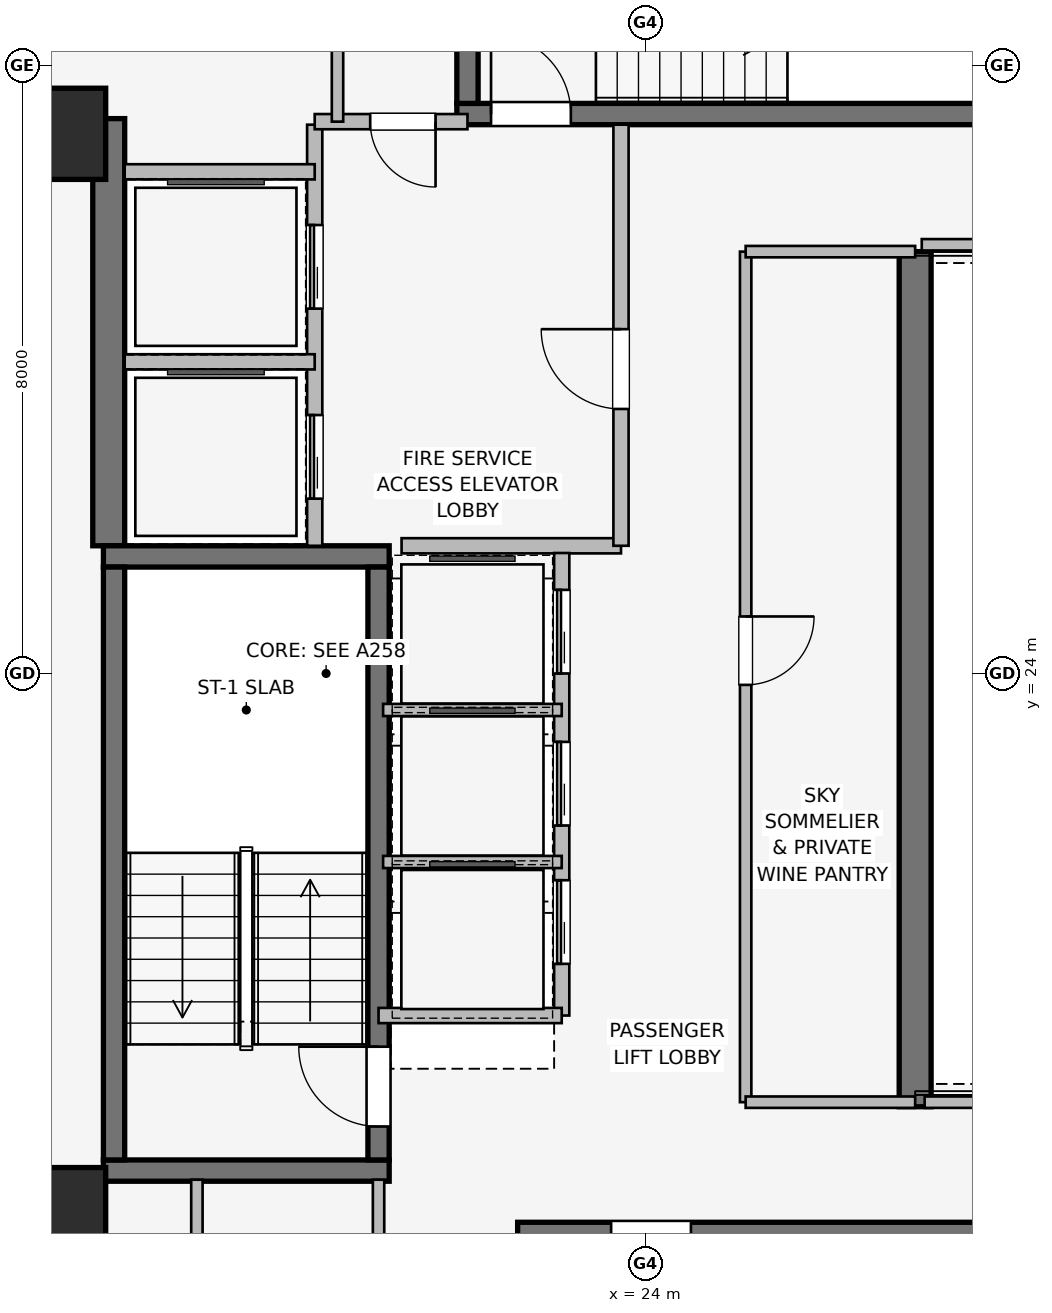
"""IFC4 building model, lengths in metres.
Left out: names, types, materials, properties, quantities, classifications, styles, units other than length and angle.
Written with IfcOpenShell. Run it as: python <this file> out.ifc"""

import sys

from ifc_helpers import new_model, si_unit, direction, frame, frame_2d, origin, origin_2d, place, context, subcontext, project, spatial, rectangle, extrude, element, fill, save


model = new_model("IFC4")
c1 = context("Model", 3, precision=1e-05, world=origin(), true_north=direction((0.0, 1.0)))
c2 = subcontext(c1, "Body", "Model", "MODEL_VIEW")
j1 = project(units=[si_unit("LENGTHUNIT", "METRE"), si_unit("PLANEANGLEUNIT", "RADIAN")], contexts=[c1])
p1 = place(None, origin())
s1 = spatial("IfcSite", under=j1, at=p1, CompositionType="ELEMENT")
p2 = place(p1, origin())
s2 = spatial("IfcBuilding", under=s1, at=p2, CompositionType="ELEMENT")
p3 = place(p2, frame((0.0, 0.0, 206.8)))
s3 = spatial("IfcBuildingStorey", under=s2, at=p3, CompositionType="ELEMENT", Elevation=206.8)
p4 = place(p3, frame((16.94, 25.68, 0.0), z_axis=(0.0, 0.0, 1.0), x_axis=(0.0, 1.0, 0.0)))
e1 = element("IfcWall", 1, at=p4, inside=s3, PredefinedType="SHEAR", context=c2, shape_type="SweptSolid", body=[
    extrude(rectangle(XDim=5.62, YDim=0.42, at=frame_2d((2.81, 0.0))), origin(), (0.0, 0.0, 1.0), 3.45),
])
p5 = place(p3, frame((27.55, 29.55, 0.0), z_axis=(0.0, 0.0, 1.0), x_axis=(0.0, -1.0, 0.0)))
e2 = element("IfcWall", 2, at=p5, inside=s3, PredefinedType="SHEAR", context=c2, shape_type="SweptSolid", body=[
    extrude(rectangle(XDim=11.25, YDim=0.42, at=frame_2d((5.625, 0.0))), origin(), (0.0, 0.0, 1.0), 3.45),
])
for number, where, z_axis, x_axis in (
    (3, (16.87, 17.46, 0.0), (0.0, 0.0, 1.0), (1.0, 0.0, 0.0)),
    (4, (20.63, 25.54, 0.0), (0.0, 0.0, 1.0), (-1.0, 0.0, 0.0)),
):
    element("IfcWall", number, at=place(p3, frame(where, z_axis=z_axis, x_axis=x_axis)), inside=s3, PredefinedType="SHEAR", context=c2, shape_type="SweptSolid", body=[
        extrude(rectangle(XDim=3.76, YDim=0.28, at=frame_2d((1.88, 0.0))), origin(), (0.0, 0.0, 1.0), 3.45),
    ])
p6 = place(p3, frame((17.01, 25.4, 0.0), z_axis=(0.0, 0.0, 1.0), x_axis=(0.0, -1.0, 0.0)))
e5 = element("IfcWall", 5, at=p6, inside=s3, PredefinedType="SHEAR", context=c2, shape_type="SweptSolid", body=[
    extrude(rectangle(XDim=7.8, YDim=0.28, at=frame_2d((3.9, 0.0))), origin(), (0.0, 0.0, 1.0), 3.45),
])
p7 = place(p3, frame((20.49, 17.6, 0.0), z_axis=(0.0, 0.0, 1.0), x_axis=(0.0, 1.0, 0.0)))
e6 = element("IfcWall", 6, at=p7, inside=s3, PredefinedType="SHEAR", context=c2, shape_type="SweptSolid", body=[
    extrude(rectangle(XDim=7.8, YDim=0.28, at=frame_2d((3.9, 0.0))), origin(), (0.0, 0.0, 1.0), 3.45),
])
p8 = place(p7, frame((0.44, 0.0, 0.0)))
e7 = element("IfcOpeningElement", 7, at=p8, cuts=e6, PredefinedType="OPENING", context=c2, shape_type="SweptSolid", body=[
    extrude(rectangle(XDim=1.05, YDim=2.0, at=frame_2d((0.525, 1.0))), frame((0.0, 0.15, 0.0), z_axis=(0.0, -1.0, 0.0), x_axis=(1.0, 0.0, 0.0)), (0.0, 0.0, 1.0), 0.3),
])
p9 = place(p3, frame((30.68, 16.64, 0.0), z_axis=(0.0, 0.0, 1.0), x_axis=(-1.0, 0.0, 0.0)))
e8 = element("IfcWall", 8, at=p9, inside=s3, PredefinedType="SHEAR", context=c2, shape_type="SweptSolid", body=[
    extrude(rectangle(XDim=8.36, YDim=0.28, at=frame_2d((4.18, 0.0))), origin(), (0.0, 0.0, 1.0), 3.45),
])
p10 = place(p9, frame((6.08, 0.0, 0.0)))
e9 = element("IfcOpeningElement", 9, at=p10, cuts=e8, PredefinedType="OPENING", context=c2, shape_type="SweptSolid", body=[
    extrude(rectangle(XDim=1.05, YDim=2.0, at=frame_2d((0.525, 1.0))), frame((0.0, 0.15, 0.0), z_axis=(0.0, -1.0, 0.0), x_axis=(1.0, 0.0, 0.0)), (0.0, 0.0, 1.0), 0.3),
])
p11 = place(p3, frame((21.52, 31.36, 0.0), z_axis=(0.0, 0.0, 1.0), x_axis=(1.0, 0.0, 0.0)))
e10 = element("IfcWall", 10, at=p11, inside=s3, PredefinedType="SHEAR", context=c2, shape_type="SweptSolid", body=[
    extrude(rectangle(XDim=8.36, YDim=0.28, at=frame_2d((4.18, 0.0))), origin(), (0.0, 0.0, 1.0), 3.45),
])
p12 = place(p11, frame((0.45, 0.0, 0.0)))
e11 = element("IfcOpeningElement", 11, at=p12, cuts=e10, PredefinedType="OPENING", context=c2, shape_type="SweptSolid", body=[
    extrude(rectangle(XDim=1.05, YDim=2.0, at=frame_2d((0.525, 1.0))), frame((0.0, 0.15, 0.0), z_axis=(0.0, -1.0, 0.0), x_axis=(1.0, 0.0, 0.0)), (0.0, 0.0, 1.0), 0.3),
])
p13 = place(p3, frame((21.66, 34.7, 0.0), z_axis=(0.0, 0.0, 1.0), x_axis=(0.0, -1.0, 0.0)))
e12 = element("IfcWall", 12, at=p13, inside=s3, PredefinedType="SHEAR", context=c2, shape_type="SweptSolid", body=[
    extrude(rectangle(XDim=3.2, YDim=0.28, at=frame_2d((1.6, 0.0))), origin(), (0.0, 0.0, 1.0), 3.45),
])
for number, where, z_axis, x_axis in (
    (13, (16.3, 16.9, 0.0), (0.0, 0.0, 1.0), (1.0, 0.0, 0.0)),
    (14, (16.3, 31.1, 0.0), (0.0, 0.0, 1.0), (1.0, 0.0, 0.0)),
):
    element("IfcColumn", number, at=place(p3, frame(where, z_axis=z_axis, x_axis=x_axis)), inside=s3, PredefinedType="COLUMN", context=c2, shape_type="SweptSolid", body=[
        extrude(rectangle(XDim=1.2, YDim=1.2, at=origin_2d()), origin(), (0.0, 0.0, 1.0), 3.45),
    ])
p14 = place(p3, frame((19.65, 25.68, 0.0), z_axis=(0.0, 0.0, 1.0), x_axis=(0.0, 1.0, 0.0)))
e15 = element("IfcWall", 15, at=p14, inside=s3, PredefinedType="PARTITIONING", context=c2, shape_type="SweptSolid", body=[
    extrude(rectangle(XDim=5.54, YDim=0.2, at=frame_2d((2.77, 0.0))), origin(), (0.0, 0.0, 1.0), 3.19),
])
p15 = place(p14, frame((0.62, 0.0, 0.0)))
e16 = element("IfcOpeningElement", 16, at=p15, cuts=e15, PredefinedType="OPENING", context=c2, shape_type="SweptSolid", body=[
    extrude(rectangle(XDim=1.1, YDim=2.2, at=frame_2d((0.55, 1.1))), frame((0.0, 0.11, 0.0), z_axis=(0.0, -1.0, 0.0), x_axis=(1.0, 0.0, 0.0)), (0.0, 0.0, 1.0), 0.22),
])
p16 = place(p14, frame((3.12, 0.0, 0.0)))
e17 = element("IfcOpeningElement", 17, at=p16, cuts=e15, PredefinedType="OPENING", context=c2, shape_type="SweptSolid", body=[
    extrude(rectangle(XDim=1.1, YDim=2.2, at=frame_2d((0.55, 1.1))), frame((0.0, 0.11, 0.0), z_axis=(0.0, -1.0, 0.0), x_axis=(1.0, 0.0, 0.0)), (0.0, 0.0, 1.0), 0.22),
])
p17 = place(p3, frame((20.793, 25.68, 0.0), z_axis=(0.0, 0.0, 1.0), x_axis=(1.0, 0.0, 0.0)))
e18 = element("IfcWall", 18, at=p17, inside=s3, PredefinedType="PARTITIONING", context=c2, shape_type="SweptSolid", body=[
    extrude(rectangle(XDim=2.887, YDim=0.2, at=frame_2d((1.443, 0.0))), origin(), (0.0, 0.0, 1.0), 3.19),
])
p18 = place(p3, frame((23.68, 25.68, 0.0), z_axis=(0.0, 0.0, 1.0), x_axis=(0.0, 1.0, 0.0)))
e19 = element("IfcWall", 19, at=p18, inside=s3, PredefinedType="PARTITIONING", context=c2, shape_type="SweptSolid", body=[
    extrude(rectangle(XDim=5.54, YDim=0.2, at=frame_2d((2.77, 0.0))), origin(), (0.0, 0.0, 1.0), 3.19),
])
p19 = place(p18, frame((1.8, 0.0, 0.0)))
e20 = element("IfcOpeningElement", 20, at=p19, cuts=e19, PredefinedType="OPENING", context=c2, shape_type="SweptSolid", body=[
    extrude(rectangle(XDim=1.05, YDim=2.0, at=frame_2d((0.525, 1.0))), frame((0.0, 0.11, 0.0), z_axis=(0.0, -1.0, 0.0), x_axis=(1.0, 0.0, 0.0)), (0.0, 0.0, 1.0), 0.22),
])
p20 = place(p3, frame((21.66, 31.26, 0.0), z_axis=(0.0, 0.0, 1.0), x_axis=(-1.0, 0.0, 0.0)))
e21 = element("IfcWall", 21, at=p20, inside=s3, PredefinedType="PARTITIONING", context=c2, shape_type="SweptSolid", body=[
    extrude(rectangle(XDim=2.01, YDim=0.2, at=frame_2d((1.005, 0.0))), origin(), (0.0, 0.0, 1.0), 3.19),
])
p21 = place(p20, frame((0.42, 0.0, 0.0)))
e22 = element("IfcOpeningElement", 22, at=p21, cuts=e21, PredefinedType="OPENING", context=c2, shape_type="SweptSolid", body=[
    extrude(rectangle(XDim=0.86, YDim=2.0, at=frame_2d((0.43, 1.0))), frame((0.0, 0.11, 0.0), z_axis=(0.0, -1.0, 0.0), x_axis=(1.0, 0.0, 0.0)), (0.0, 0.0, 1.0), 0.22),
])
p22 = place(p3, frame((17.15, 28.1, 0.0), z_axis=(0.0, 0.0, 1.0), x_axis=(1.0, 0.0, 0.0)))
e23 = element("IfcWall", 23, at=p22, inside=s3, PredefinedType="PARTITIONING", context=c2, shape_type="SweptSolid", body=[
    extrude(rectangle(XDim=2.5, YDim=0.2, at=frame_2d((1.25, 0.0))), origin(), (0.0, 0.0, 1.0), 3.19),
])
p23 = place(p3, frame((19.65, 30.6, 0.0), z_axis=(0.0, 0.0, 1.0), x_axis=(-1.0, 0.0, 0.0)))
e24 = element("IfcWall", 24, at=p23, inside=s3, PredefinedType="PARTITIONING", context=c2, shape_type="SweptSolid", body=[
    extrude(rectangle(XDim=2.5, YDim=0.2, at=frame_2d((1.25, 0.0))), origin(), (0.0, 0.0, 1.0), 2.09),
])
p24 = place(p3, frame((22.9, 19.5, 0.0), z_axis=(0.0, 0.0, 1.0), x_axis=(0.0, 1.0, 0.0)))
e25 = element("IfcWall", 25, at=p24, inside=s3, PredefinedType="PARTITIONING", context=c2, shape_type="SweptSolid", body=[
    extrude(rectangle(XDim=6.085, YDim=0.2, at=frame_2d((3.042, 0.0))), origin(), (0.0, 0.0, 1.0), 3.19),
])
p25 = place(p24, frame((0.68, 0.0, 0.0)))
e26 = element("IfcOpeningElement", 26, at=p25, cuts=e25, PredefinedType="OPENING", context=c2, shape_type="SweptSolid", body=[
    extrude(rectangle(XDim=1.1, YDim=2.2, at=frame_2d((0.55, 1.1))), frame((0.0, 0.11, 0.0), z_axis=(0.0, -1.0, 0.0), x_axis=(1.0, 0.0, 0.0)), (0.0, 0.0, 1.0), 0.22),
])
p26 = place(p24, frame((2.5, 0.0, 0.0)))
e27 = element("IfcOpeningElement", 27, at=p26, cuts=e25, PredefinedType="OPENING", context=c2, shape_type="SweptSolid", body=[
    extrude(rectangle(XDim=1.1, YDim=2.2, at=frame_2d((0.55, 1.1))), frame((0.0, 0.11, 0.0), z_axis=(0.0, -1.0, 0.0), x_axis=(1.0, 0.0, 0.0)), (0.0, 0.0, 1.0), 0.22),
])
p27 = place(p24, frame((4.5, 0.0, 0.0)))
e28 = element("IfcOpeningElement", 28, at=p27, cuts=e25, PredefinedType="OPENING", context=c2, shape_type="SweptSolid", body=[
    extrude(rectangle(XDim=1.1, YDim=2.2, at=frame_2d((0.55, 1.1))), frame((0.0, 0.11, 0.0), z_axis=(0.0, -1.0, 0.0), x_axis=(1.0, 0.0, 0.0)), (0.0, 0.0, 1.0), 0.22),
])
p28 = place(p3, frame((20.49, 19.5, 0.0), z_axis=(0.0, 0.0, 1.0), x_axis=(1.0, 0.0, 0.0)))
e29 = element("IfcWall", 29, at=p28, inside=s3, PredefinedType="PARTITIONING", context=c2, shape_type="SweptSolid", body=[
    extrude(rectangle(XDim=2.41, YDim=0.2, at=frame_2d((1.205, 0.0))), origin(), (0.0, 0.0, 1.0), 2.09),
])
for number, where, z_axis, x_axis in (
    (30, (20.55, 21.52, 0.0), (0.0, 0.0, 1.0), (1.0, 0.0, 0.0)),
    (31, (20.55, 23.52, 0.0), (0.0, 0.0, 1.0), (1.0, 0.0, 0.0)),
):
    element("IfcWall", number, at=place(p3, frame(where, z_axis=z_axis, x_axis=x_axis)), inside=s3, PredefinedType="PARTITIONING", context=c2, shape_type="SweptSolid", body=[
        extrude(rectangle(XDim=2.35, YDim=0.16, at=frame_2d((1.175, 0.0))), origin(), (0.0, 0.0, 1.0), 3.19),
    ])
p29 = place(p3, frame((25.32, 29.55, 0.0), z_axis=(0.0, 0.0, 1.0), x_axis=(0.0, -1.0, 0.0)))
e32 = element("IfcWall", 32, at=p29, inside=s3, PredefinedType="PARTITIONING", context=c2, shape_type="SweptSolid", body=[
    extrude(rectangle(XDim=11.19, YDim=0.15, at=frame_2d((5.595, 0.0))), origin(), (0.0, 0.0, 1.0), 3.19),
])
p30 = place(p29, frame((4.8, 0.0, 0.0)))
e33 = element("IfcOpeningElement", 33, at=p30, cuts=e32, PredefinedType="OPENING", context=c2, shape_type="SweptSolid", body=[
    extrude(rectangle(XDim=0.9, YDim=2.0, at=frame_2d((0.45, 1.0))), frame((0.0, 0.085, 0.0), z_axis=(0.0, -1.0, 0.0), x_axis=(1.0, 0.0, 0.0)), (0.0, 0.0, 1.0), 0.17),
])
p31 = place(p3, frame((25.32, 18.36, 0.0), z_axis=(0.0, 0.0, 1.0), x_axis=(1.0, 0.0, 0.0)))
e34 = element("IfcWall", 34, at=p31, inside=s3, PredefinedType="PARTITIONING", context=c2, shape_type="SweptSolid", body=[
    extrude(rectangle(XDim=2.23, YDim=0.15, at=frame_2d((1.115, 0.0))), origin(), (0.0, 0.0, 1.0), 3.19),
])
p32 = place(p3, frame((27.55, 29.55, 0.0), z_axis=(0.0, 0.0, 1.0), x_axis=(-1.0, 0.0, 0.0)))
e35 = element("IfcWall", 35, at=p32, inside=s3, PredefinedType="PARTITIONING", context=c2, shape_type="SweptSolid", body=[
    extrude(rectangle(XDim=2.23, YDim=0.15, at=frame_2d((1.115, 0.0))), origin(), (0.0, 0.0, 1.0), 2.09),
])
p33 = place(p3, frame((18.1, 17.34, 0.0), z_axis=(0.0, 0.0, 1.0), x_axis=(0.0, -1.0, 0.0)))
e36 = element("IfcWall", 36, at=p33, inside=s3, PredefinedType="PARTITIONING", context=c2, shape_type="SweptSolid", body=[
    extrude(rectangle(XDim=3.66, YDim=0.15, at=frame_2d((1.83, 0.0))), origin(), (0.0, 0.0, 1.0), 3.19),
])
p34 = place(p3, frame((20.49, 13.68, 0.0), z_axis=(0.0, 0.0, 1.0), x_axis=(0.0, 1.0, 0.0)))
e37 = element("IfcWall", 37, at=p34, inside=s3, PredefinedType="PARTITIONING", context=c2, shape_type="SweptSolid", body=[
    extrude(rectangle(XDim=3.66, YDim=0.15, at=frame_2d((1.83, 0.0))), origin(), (0.0, 0.0, 1.0), 3.19),
])
p35 = place(p34, frame((1.25, 0.0, 0.0)))
e38 = element("IfcOpeningElement", 38, at=p35, cuts=e37, PredefinedType="OPENING", context=c2, shape_type="SweptSolid", body=[
    extrude(rectangle(XDim=0.9, YDim=2.0, at=frame_2d((0.45, 1.0))), frame((0.0, 0.085, 0.0), z_axis=(0.0, -1.0, 0.0), x_axis=(1.0, 0.0, 0.0)), (0.0, 0.0, 1.0), 0.17),
])
p36 = place(p3, frame((19.95, 32.85, 0.0), z_axis=(0.0, 0.0, 1.0), x_axis=(0.0, -1.0, 0.0)))
e39 = element("IfcWall", 39, at=p36, inside=s3, PredefinedType="PARTITIONING", context=c2, shape_type="SweptSolid", body=[
    extrude(rectangle(XDim=1.59, YDim=0.15, at=frame_2d((0.795, 0.0))), origin(), (0.0, 0.0, 1.0), 3.19),
])
p37 = place(p3, frame((27.675, 18.36, 0.0), z_axis=(0.0, 0.0, 1.0), x_axis=(1.0, 0.0, 0.0)))
e40 = element("IfcWall", 40, at=p37, inside=s3, PredefinedType="PARTITIONING", context=c2, shape_type="SweptSolid", body=[
    extrude(rectangle(XDim=12.165, YDim=0.15, at=frame_2d((6.083, 0.0))), origin(), (0.0, 0.0, 1.0), 2.331),
])
p38 = place(p3, frame((39.84, 29.64, 0.0), z_axis=(0.0, 0.0, 1.0), x_axis=(-1.0, 0.0, 0.0)))
e41 = element("IfcWall", 41, at=p38, inside=s3, PredefinedType="PARTITIONING", context=c2, shape_type="SweptSolid", body=[
    extrude(rectangle(XDim=12.203, YDim=0.15, at=frame_2d((6.102, 0.0))), origin(), (0.0, 0.0, 1.0), 2.331),
])
p39 = place(p8, origin())
e42 = element("IfcDoor", 42, at=p39, inside=s3, OperationType="SINGLE_SWING_RIGHT", PredefinedType="DOOR", context=c2, shape_type="SweptSolid", body=[
    extrude(rectangle(XDim=1.05, YDim=2.0, at=frame_2d((0.525, 1.0))), frame((0.0, 0.025, 0.0), z_axis=(0.0, -1.0, 0.0), x_axis=(1.0, 0.0, 0.0)), (0.0, 0.0, 1.0), 0.05),
])
fill(e7, e42)
p40 = place(p10, origin())
e43 = element("IfcDoor", 43, at=p40, inside=s3, OperationType="SINGLE_SWING_RIGHT", PredefinedType="DOOR", context=c2, shape_type="SweptSolid", body=[
    extrude(rectangle(XDim=1.05, YDim=2.0, at=frame_2d((0.525, 1.0))), frame((0.0, 0.025, 0.0), z_axis=(0.0, -1.0, 0.0), x_axis=(1.0, 0.0, 0.0)), (0.0, 0.0, 1.0), 0.05),
])
fill(e9, e43)
p41 = place(p12, origin())
e44 = element("IfcDoor", 44, at=p41, inside=s3, OperationType="SINGLE_SWING_LEFT", PredefinedType="DOOR", context=c2, shape_type="SweptSolid", body=[
    extrude(rectangle(XDim=1.05, YDim=2.0, at=frame_2d((0.525, 1.0))), frame((0.0, 0.025, 0.0), z_axis=(0.0, -1.0, 0.0), x_axis=(1.0, 0.0, 0.0)), (0.0, 0.0, 1.0), 0.05),
])
fill(e11, e44)
p42 = place(p15, origin())
e45 = element("IfcDoor", 45, at=p42, inside=s3, OperationType="SLIDING_TO_LEFT", PredefinedType="DOOR", context=c2, shape_type="SweptSolid", body=[
    extrude(rectangle(XDim=1.1, YDim=2.2, at=frame_2d((0.55, 1.1))), frame((0.0, 0.025, 0.0), z_axis=(0.0, -1.0, 0.0), x_axis=(1.0, 0.0, 0.0)), (0.0, 0.0, 1.0), 0.05),
])
fill(e16, e45)
p43 = place(p16, origin())
e46 = element("IfcDoor", 46, at=p43, inside=s3, OperationType="SLIDING_TO_LEFT", PredefinedType="DOOR", context=c2, shape_type="SweptSolid", body=[
    extrude(rectangle(XDim=1.1, YDim=2.2, at=frame_2d((0.55, 1.1))), frame((0.0, 0.025, 0.0), z_axis=(0.0, -1.0, 0.0), x_axis=(1.0, 0.0, 0.0)), (0.0, 0.0, 1.0), 0.05),
])
fill(e17, e46)
p44 = place(p19, origin())
e47 = element("IfcDoor", 47, at=p44, inside=s3, OperationType="SINGLE_SWING_RIGHT", PredefinedType="DOOR", context=c2, shape_type="SweptSolid", body=[
    extrude(rectangle(XDim=1.05, YDim=2.0, at=frame_2d((0.525, 1.0))), frame((0.0, 0.025, 0.0), z_axis=(0.0, -1.0, 0.0), x_axis=(1.0, 0.0, 0.0)), (0.0, 0.0, 1.0), 0.05),
])
fill(e20, e47)
p45 = place(p21, origin())
e48 = element("IfcDoor", 48, at=p45, inside=s3, OperationType="SINGLE_SWING_LEFT", PredefinedType="DOOR", context=c2, shape_type="SweptSolid", body=[
    extrude(rectangle(XDim=0.86, YDim=2.0, at=frame_2d((0.43, 1.0))), frame((0.0, 0.025, 0.0), z_axis=(0.0, -1.0, 0.0), x_axis=(1.0, 0.0, 0.0)), (0.0, 0.0, 1.0), 0.05),
])
fill(e22, e48)
p46 = place(p25, origin())
e49 = element("IfcDoor", 49, at=p46, inside=s3, OperationType="SLIDING_TO_LEFT", PredefinedType="DOOR", context=c2, shape_type="SweptSolid", body=[
    extrude(rectangle(XDim=1.1, YDim=2.2, at=frame_2d((0.55, 1.1))), frame((0.0, 0.025, 0.0), z_axis=(0.0, -1.0, 0.0), x_axis=(1.0, 0.0, 0.0)), (0.0, 0.0, 1.0), 0.05),
])
fill(e26, e49)
p47 = place(p26, origin())
e50 = element("IfcDoor", 50, at=p47, inside=s3, OperationType="SLIDING_TO_LEFT", PredefinedType="DOOR", context=c2, shape_type="SweptSolid", body=[
    extrude(rectangle(XDim=1.1, YDim=2.2, at=frame_2d((0.55, 1.1))), frame((0.0, 0.025, 0.0), z_axis=(0.0, -1.0, 0.0), x_axis=(1.0, 0.0, 0.0)), (0.0, 0.0, 1.0), 0.05),
])
fill(e27, e50)
p48 = place(p27, origin())
e51 = element("IfcDoor", 51, at=p48, inside=s3, OperationType="SLIDING_TO_LEFT", PredefinedType="DOOR", context=c2, shape_type="SweptSolid", body=[
    extrude(rectangle(XDim=1.1, YDim=2.2, at=frame_2d((0.55, 1.1))), frame((0.0, 0.025, 0.0), z_axis=(0.0, -1.0, 0.0), x_axis=(1.0, 0.0, 0.0)), (0.0, 0.0, 1.0), 0.05),
])
fill(e28, e51)
p49 = place(p30, origin())
e52 = element("IfcDoor", 52, at=p49, inside=s3, OperationType="SINGLE_SWING_LEFT", PredefinedType="DOOR", context=c2, shape_type="SweptSolid", body=[
    extrude(rectangle(XDim=0.9, YDim=2.0, at=frame_2d((0.45, 1.0))), frame((0.0, 0.025, 0.0), z_axis=(0.0, -1.0, 0.0), x_axis=(1.0, 0.0, 0.0)), (0.0, 0.0, 1.0), 0.05),
])
fill(e33, e52)
save(model, sys.argv[1])
